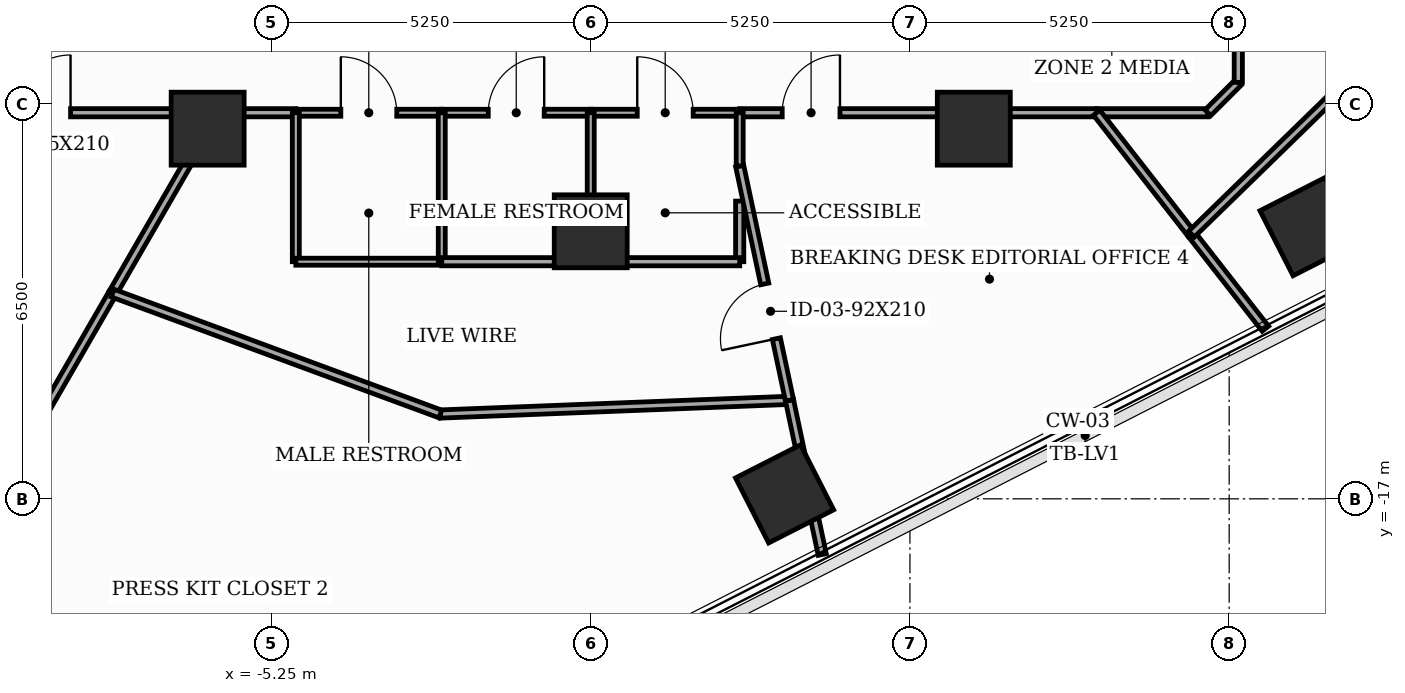
"""IFC4 building model, lengths in metres.
Left out: names, types, materials, properties, quantities, classifications, styles, units other than length and angle.
Written with IfcOpenShell. Run it as: python <this file> out.ifc"""

import sys

from ifc_helpers import new_model, si_unit, direction, frame, frame_2d, origin, origin_2d, place, context, subcontext, project, spatial, rectangle, extrude, element, fill, save


model = new_model("IFC4")
c1 = context("Model", 3, precision=1e-05, world=origin(), true_north=direction((0.0, 1.0)))
c2 = subcontext(c1, "Body", "Model", "MODEL_VIEW")
j1 = project(units=[si_unit("LENGTHUNIT", "METRE"), si_unit("PLANEANGLEUNIT", "RADIAN")], contexts=[c1])
p1 = place(None, origin())
s1 = spatial("IfcSite", under=j1, at=p1, CompositionType="ELEMENT")
p2 = place(p1, origin())
s2 = spatial("IfcBuilding", under=s1, at=p2, CompositionType="ELEMENT")
p3 = place(p2, frame((0.0, 0.0, 142.1)))
s3 = spatial("IfcBuildingStorey", under=s2, at=p3, CompositionType="ELEMENT", Elevation=142.1)
for number, where, z_axis, x_axis in (
    (1, (-6.3, -10.912, 0.0), (0.0, 0.0, 1.0), (1.0, 0.0, 0.0)),
    (2, (0.0, -12.6, 0.0), (0.0, 0.0, 1.0), (1.0, 0.0, 0.0)),
    (3, (6.3, -10.912, 0.0), (0.0, 0.0, 1.0), (1.0, 0.0, 0.0)),
    (4, (3.188, -16.918, 0.0), (0.0, 0.0, 1.0), (0.891, 0.454, 0.0)),
    (5, (11.813, -12.524, 0.0), (0.0, 0.0, 1.0), (0.891, 0.454, 0.0)),
):
    element("IfcColumn", number, at=place(p3, frame(where, z_axis=z_axis, x_axis=x_axis)), inside=s3, PredefinedType="COLUMN", context=c2, shape_type="SweptSolid", body=[
        extrude(rectangle(XDim=1.2, YDim=1.2, at=origin_2d()), origin(), (0.0, 0.0, 1.0), 3.7),
    ])
p4 = place(p3, frame((-10.15, -10.65, 0.0), z_axis=(0.0, 0.0, 1.0), x_axis=(1.0, 0.0, 0.0)))
e6 = element("IfcWall", 6, at=p4, inside=s3, PredefinedType="PARTITIONING", context=c2, shape_type="SweptSolid", body=[
    extrude(rectangle(XDim=4.001, YDim=0.135, at=frame_2d((2.0, 0.0))), origin(), (0.0, 0.0, 1.0), 2.785),
])
p5 = place(p4, frame((0.645, 0.0, 0.0)))
e7 = element("IfcOpeningElement", 7, at=p5, cuts=e6, PredefinedType="OPENING", context=c2, shape_type="SweptSolid", body=[
    extrude(rectangle(XDim=0.95, YDim=2.1, at=frame_2d((0.475, 1.05))), frame((0.0, 0.077, 0.0), z_axis=(0.0, -1.0, 0.0), x_axis=(1.0, 0.0, 0.0)), (0.0, 0.0, 1.0), 0.155),
])
p6 = place(p3, frame((-4.85, -10.65, 0.0), z_axis=(0.0, 0.0, 1.0), x_axis=(1.0, 0.0, 0.0)))
e8 = element("IfcWall", 8, at=p6, inside=s3, PredefinedType="PARTITIONING", context=c2, shape_type="SweptSolid", body=[
    extrude(rectangle(XDim=2.4, YDim=0.115, at=frame_2d((1.2, 0.0))), origin(), (0.0, 0.0, 1.0), 3.5),
])
p7 = place(p6, frame((0.74, 0.0, 0.0)))
e9 = element("IfcOpeningElement", 9, at=p7, cuts=e8, PredefinedType="OPENING", context=c2, shape_type="SweptSolid", body=[
    extrude(rectangle(XDim=0.92, YDim=2.1, at=frame_2d((0.46, 1.05))), frame((0.0, 0.067, 0.0), z_axis=(0.0, -1.0, 0.0), x_axis=(1.0, 0.0, 0.0)), (0.0, 0.0, 1.0), 0.135),
])
p8 = place(p3, frame((-6.149, -10.65, 0.0), z_axis=(0.0, 0.0, 1.0), x_axis=(1.0, 0.0, 0.0)))
e10 = element("IfcWall", 10, at=p8, inside=s3, PredefinedType="PARTITIONING", context=c2, shape_type="SweptSolid", body=[
    extrude(rectangle(XDim=1.299, YDim=0.135, at=frame_2d((0.649, 0.0))), origin(), (0.0, 0.0, 1.0), 3.5),
])
p9 = place(p3, frame((-2.45, -10.65, 0.0), z_axis=(0.0, 0.0, 1.0), x_axis=(1.0, 0.0, 0.0)))
e11 = element("IfcWall", 11, at=p9, inside=s3, PredefinedType="PARTITIONING", context=c2, shape_type="SweptSolid", body=[
    extrude(rectangle(XDim=2.45, YDim=0.115, at=frame_2d((1.225, 0.0))), origin(), (0.0, 0.0, 1.0), 2.785),
])
p10 = place(p9, frame((0.765, 0.0, 0.0)))
e12 = element("IfcOpeningElement", 12, at=p10, cuts=e11, PredefinedType="OPENING", context=c2, shape_type="SweptSolid", body=[
    extrude(rectangle(XDim=0.92, YDim=2.1, at=frame_2d((0.46, 1.05))), frame((0.0, 0.067, 0.0), z_axis=(0.0, -1.0, 0.0), x_axis=(1.0, 0.0, 0.0)), (0.0, 0.0, 1.0), 0.135),
])
p11 = place(p3, frame((0.0, -10.65, 0.0), z_axis=(0.0, 0.0, 1.0), x_axis=(1.0, 0.0, 0.0)))
e13 = element("IfcWall", 13, at=p11, inside=s3, PredefinedType="PARTITIONING", context=c2, shape_type="SweptSolid", body=[
    extrude(rectangle(XDim=2.45, YDim=0.115, at=frame_2d((1.225, 0.0))), origin(), (0.0, 0.0, 1.0), 3.5),
])
p12 = place(p11, frame((0.765, 0.0, 0.0)))
e14 = element("IfcOpeningElement", 14, at=p12, cuts=e13, PredefinedType="OPENING", context=c2, shape_type="SweptSolid", body=[
    extrude(rectangle(XDim=0.92, YDim=2.1, at=frame_2d((0.46, 1.05))), frame((0.0, 0.067, 0.0), z_axis=(0.0, -1.0, 0.0), x_axis=(1.0, 0.0, 0.0)), (0.0, 0.0, 1.0), 0.135),
])
p13 = place(p3, frame((2.45, -10.65, 0.0), z_axis=(0.0, 0.0, 1.0), x_axis=(1.0, 0.0, 0.0)))
e15 = element("IfcWall", 15, at=p13, inside=s3, PredefinedType="PARTITIONING", context=c2, shape_type="SweptSolid", body=[
    extrude(rectangle(XDim=5.871, YDim=0.135, at=frame_2d((2.936, 0.0))), origin(), (0.0, 0.0, 1.0), 2.785),
])
p14 = place(p13, frame((0.699, 0.0, 0.0)))
e16 = element("IfcOpeningElement", 16, at=p14, cuts=e15, PredefinedType="OPENING", context=c2, shape_type="SweptSolid", body=[
    extrude(rectangle(XDim=0.95, YDim=2.1, at=frame_2d((0.475, 1.05))), frame((0.0, 0.077, 0.0), z_axis=(0.0, -1.0, 0.0), x_axis=(1.0, 0.0, 0.0)), (0.0, 0.0, 1.0), 0.155),
])
p15 = place(p3, frame((8.321, -10.65, 0.0), z_axis=(0.0, 0.0, 1.0), x_axis=(1.0, 0.0, 0.0)))
e17 = element("IfcWall", 17, at=p15, inside=s3, PredefinedType="PARTITIONING", context=c2, shape_type="SweptSolid", body=[
    extrude(rectangle(XDim=1.829, YDim=0.135, at=frame_2d((0.915, 0.0))), origin(), (0.0, 0.0, 1.0), 3.5),
])
p16 = place(p3, frame((10.15, -10.65, 0.0), z_axis=(0.0, 0.0, 1.0), x_axis=(0.707106781187, 0.707106781187, 0.0)))
e18 = element("IfcWall", 18, at=p16, inside=s3, PredefinedType="PARTITIONING", context=c2, shape_type="SweptSolid", body=[
    extrude(rectangle(XDim=0.707, YDim=0.135, at=frame_2d((0.354, 0.0))), origin(), (0.0, 0.0, 1.0), 3.5),
])
p17 = place(p3, frame((10.65, -10.15, 0.0), z_axis=(0.0, 0.0, 1.0), x_axis=(0.0, 1.0, 0.0)))
e19 = element("IfcWall", 19, at=p17, inside=s3, PredefinedType="PARTITIONING", context=c2, shape_type="SweptSolid", body=[
    extrude(rectangle(XDim=5.408, YDim=0.135, at=frame_2d((2.704, 0.0))), origin(), (0.0, 0.0, 1.0), 2.785),
])
p18 = place(p17, frame((0.607, 0.0, 0.0)))
e20 = element("IfcOpeningElement", 20, at=p18, cuts=e19, PredefinedType="OPENING", context=c2, shape_type="SweptSolid", body=[
    extrude(rectangle(XDim=0.95, YDim=2.1, at=frame_2d((0.475, 1.05))), frame((0.0, 0.077, 0.0), z_axis=(0.0, -1.0, 0.0), x_axis=(1.0, 0.0, 0.0)), (0.0, 0.0, 1.0), 0.155),
])
p19 = place(p3, frame((-15.633, -27.077, 0.0), z_axis=(0.0, 0.0, 1.0), x_axis=(0.499977642092, 0.866038311744, 0.0)))
e21 = element("IfcWall", 21, at=p19, inside=s3, PredefinedType="PARTITIONING", context=c2, shape_type="SweptSolid", body=[
    extrude(rectangle(XDim=15.542, YDim=0.135, at=frame_2d((7.771, 0.0))), origin(), (0.0, 0.0, 1.0), 2.985),
])
p20 = place(p19, frame((7.311, 0.0, 0.0)))
e22 = element("IfcOpeningElement", 22, at=p20, cuts=e21, PredefinedType="OPENING", context=c2, shape_type="SweptSolid", body=[
    extrude(rectangle(XDim=0.92, YDim=2.1, at=frame_2d((0.46, 1.05))), frame((0.0, 0.077, 0.0), z_axis=(0.0, -1.0, 0.0), x_axis=(1.0, 0.0, 0.0)), (0.0, 0.0, 1.0), 0.155),
])
p21 = place(p3, frame((-7.862, -13.617, 0.0), z_axis=(0.0, 0.0, 1.0), x_axis=(0.500024700597, 0.866011142419, 0.0)))
e23 = element("IfcWall", 23, at=p21, inside=s3, PredefinedType="PARTITIONING", context=c2, shape_type="SweptSolid", body=[
    extrude(rectangle(XDim=3.426, YDim=0.135, at=frame_2d((1.713, 0.0))), origin(), (0.0, 0.0, 1.0), 2.785),
])
p22 = place(p3, frame((3.269, -15.38, 0.0), z_axis=(0.0, 0.0, 1.0), x_axis=(-0.999232211705, -0.039178911299, 0.0)))
e24 = element("IfcWall", 24, at=p22, inside=s3, PredefinedType="PARTITIONING", context=c2, shape_type="SweptSolid", body=[
    extrude(rectangle(XDim=5.745, YDim=0.135, at=frame_2d((2.873, 0.0))), origin(), (0.0, 0.0, 1.0), 2.885),
])
p23 = place(p3, frame((-2.472, -15.605, 0.0), z_axis=(0.0, 0.0, 1.0), x_axis=(-0.938218989818, 0.34604208869, 0.0)))
e25 = element("IfcWall", 25, at=p23, inside=s3, PredefinedType="PARTITIONING", context=c2, shape_type="SweptSolid", body=[
    extrude(rectangle(XDim=5.745, YDim=0.135, at=frame_2d((2.873, 0.0))), origin(), (0.0, 0.0, 1.0), 3.5),
])
p24 = place(p3, frame((3.808, -17.916, 0.0), z_axis=(0.0, 0.0, 1.0), x_axis=(-0.207728113852, 0.978186603218, 0.0)))
e26 = element("IfcWall", 26, at=p24, inside=s3, PredefinedType="PARTITIONING", context=c2, shape_type="SweptSolid", body=[
    extrude(rectangle(XDim=2.593, YDim=0.135, at=frame_2d((1.296, 0.0))), origin(), (0.0, 0.0, 1.0), 2.985),
])
p25 = place(p3, frame((-4.85, -10.65, 0.0), z_axis=(0.0, 0.0, 1.0), x_axis=(0.0, -1.0, 0.0)))
e27 = element("IfcWall", 27, at=p25, inside=s3, PredefinedType="PARTITIONING", context=c2, shape_type="SweptSolid", body=[
    extrude(rectangle(XDim=2.45, YDim=0.115, at=frame_2d((1.225, 0.0))), origin(), (0.0, 0.0, 1.0), 2.785),
])
p26 = place(p3, frame((-4.85, -13.1, 0.0), z_axis=(0.0, 0.0, 1.0), x_axis=(1.0, 0.0, 0.0)))
e28 = element("IfcWall", 28, at=p26, inside=s3, PredefinedType="PARTITIONING", context=c2, shape_type="SweptSolid", body=[
    extrude(rectangle(XDim=2.4, YDim=0.115, at=frame_2d((1.2, 0.0))), origin(), (0.0, 0.0, 1.0), 3.5),
])
p27 = place(p3, frame((-2.45, -13.1, 0.0), z_axis=(0.0, 0.0, 1.0), x_axis=(0.0, 1.0, 0.0)))
e29 = element("IfcWall", 29, at=p27, inside=s3, PredefinedType="PARTITIONING", context=c2, shape_type="SweptSolid", body=[
    extrude(rectangle(XDim=2.45, YDim=0.115, at=frame_2d((1.225, 0.0))), origin(), (0.0, 0.0, 1.0), 2.785),
])
p28 = place(p3, frame((0.0, -13.1, 0.0), z_axis=(0.0, 0.0, 1.0), x_axis=(-1.0, 0.0, 0.0)))
e30 = element("IfcWall", 30, at=p28, inside=s3, PredefinedType="PARTITIONING", context=c2, shape_type="SweptSolid", body=[
    extrude(rectangle(XDim=2.45, YDim=0.135, at=frame_2d((1.225, 0.0))), origin(), (0.0, 0.0, 1.0), 2.885),
])
p29 = place(p3, frame((2.45, -12.103, 0.0), z_axis=(0.0, 0.0, 1.0), x_axis=(0.0, -1.0, 0.0)))
e31 = element("IfcWall", 31, at=p29, inside=s3, PredefinedType="PARTITIONING", context=c2, shape_type="SweptSolid", body=[
    extrude(rectangle(XDim=0.997, YDim=0.135, at=frame_2d((0.499, 0.0))), origin(), (0.0, 0.0, 1.0), 2.785),
])
p30 = place(p3, frame((2.45, -13.1, 0.0), z_axis=(0.0, 0.0, 1.0), x_axis=(-1.0, 0.0, 0.0)))
e32 = element("IfcWall", 32, at=p30, inside=s3, PredefinedType="PARTITIONING", context=c2, shape_type="SweptSolid", body=[
    extrude(rectangle(XDim=2.45, YDim=0.135, at=frame_2d((1.225, 0.0))), origin(), (0.0, 0.0, 1.0), 2.885),
])
p31 = place(p3, frame((3.269, -15.38, 0.0), z_axis=(0.0, 0.0, 1.0), x_axis=(-0.207886916666, 0.978152866314, 0.0)))
e33 = element("IfcWall", 33, at=p31, inside=s3, PredefinedType="PARTITIONING", context=c2, shape_type="SweptSolid", body=[
    extrude(rectangle(XDim=3.94, YDim=0.135, at=frame_2d((1.97, 0.0))), origin(), (0.0, 0.0, 1.0), 2.785),
])
p32 = place(p31, frame((1.037, 0.0, 0.0)))
e34 = element("IfcOpeningElement", 34, at=p32, cuts=e33, PredefinedType="OPENING", context=c2, shape_type="SweptSolid", body=[
    extrude(rectangle(XDim=0.92, YDim=2.1, at=frame_2d((0.46, 1.05))), frame((0.0, 0.077, 0.0), z_axis=(0.0, -1.0, 0.0), x_axis=(1.0, 0.0, 0.0)), (0.0, 0.0, 1.0), 0.155),
])
p33 = place(p3, frame((0.0, -13.1, 0.0), z_axis=(0.0, 0.0, 1.0), x_axis=(0.0, 1.0, 0.0)))
e35 = element("IfcWall", 35, at=p33, inside=s3, PredefinedType="PARTITIONING", context=c2, shape_type="SweptSolid", body=[
    extrude(rectangle(XDim=2.45, YDim=0.115, at=frame_2d((1.225, 0.0))), origin(), (0.0, 0.0, 1.0), 2.785),
])
p34 = place(p3, frame((2.45, -11.526, 0.0), z_axis=(0.0, 0.0, 1.0), x_axis=(0.0, 1.0, 0.0)))
e36 = element("IfcWall", 36, at=p34, inside=s3, PredefinedType="PARTITIONING", context=c2, shape_type="SweptSolid", body=[
    extrude(rectangle(XDim=0.876, YDim=0.115, at=frame_2d((0.438, 0.0))), origin(), (0.0, 0.0, 1.0), 3.5),
])
p35 = place(p3, frame((9.88, -12.646, 0.0), z_axis=(0.0, 0.0, 1.0), x_axis=(-0.61549437888, 0.788141275132, 0.0)))
e37 = element("IfcWall", 37, at=p35, inside=s3, PredefinedType="PARTITIONING", context=c2, shape_type="SweptSolid", body=[
    extrude(rectangle(XDim=2.533, YDim=0.135, at=frame_2d((1.266, 0.0))), origin(), (0.0, 0.0, 1.0), 2.885),
])
p36 = place(p3, frame((11.096, -14.202, 0.0), z_axis=(0.0, 0.0, 1.0), x_axis=(-0.615761561206, 0.78793254771, 0.0)))
e38 = element("IfcWall", 38, at=p36, inside=s3, PredefinedType="PARTITIONING", context=c2, shape_type="SweptSolid", body=[
    extrude(rectangle(XDim=1.975, YDim=0.135, at=frame_2d((0.988, 0.0))), origin(), (0.0, 0.0, 1.0), 2.985),
])
p37 = place(p3, frame((9.88, -12.646, 0.0), z_axis=(0.0, 0.0, 1.0), x_axis=(0.716390870365, 0.697699162145, 0.0)))
e39 = element("IfcWall", 39, at=p37, inside=s3, PredefinedType="PARTITIONING", context=c2, shape_type="SweptSolid", body=[
    extrude(rectangle(XDim=3.918, YDim=0.135, at=frame_2d((1.959, 0.0))), origin(), (0.0, 0.0, 1.0), 2.885),
])
p38 = place(p5, origin())
e40 = element("IfcDoor", 40, at=p38, inside=s3, OperationType="SINGLE_SWING_RIGHT", PredefinedType="DOOR", context=c2, shape_type="SweptSolid", body=[
    extrude(rectangle(XDim=0.95, YDim=2.1, at=frame_2d((0.475, 1.05))), frame((0.0, 0.025, 0.0), z_axis=(0.0, -1.0, 0.0), x_axis=(1.0, 0.0, 0.0)), (0.0, 0.0, 1.0), 0.05),
])
fill(e7, e40)
p39 = place(p7, origin())
e41 = element("IfcDoor", 41, at=p39, inside=s3, OperationType="SINGLE_SWING_LEFT", PredefinedType="DOOR", context=c2, shape_type="SweptSolid", body=[
    extrude(rectangle(XDim=0.92, YDim=2.1, at=frame_2d((0.46, 1.05))), frame((0.0, 0.025, 0.0), z_axis=(0.0, -1.0, 0.0), x_axis=(1.0, 0.0, 0.0)), (0.0, 0.0, 1.0), 0.05),
])
fill(e9, e41)
p40 = place(p10, origin())
e42 = element("IfcDoor", 42, at=p40, inside=s3, OperationType="SINGLE_SWING_RIGHT", PredefinedType="DOOR", context=c2, shape_type="SweptSolid", body=[
    extrude(rectangle(XDim=0.92, YDim=2.1, at=frame_2d((0.46, 1.05))), frame((0.0, 0.025, 0.0), z_axis=(0.0, -1.0, 0.0), x_axis=(1.0, 0.0, 0.0)), (0.0, 0.0, 1.0), 0.05),
])
fill(e12, e42)
p41 = place(p12, origin())
e43 = element("IfcDoor", 43, at=p41, inside=s3, OperationType="SINGLE_SWING_LEFT", PredefinedType="DOOR", context=c2, shape_type="SweptSolid", body=[
    extrude(rectangle(XDim=0.92, YDim=2.1, at=frame_2d((0.46, 1.05))), frame((0.0, 0.025, 0.0), z_axis=(0.0, -1.0, 0.0), x_axis=(1.0, 0.0, 0.0)), (0.0, 0.0, 1.0), 0.05),
])
fill(e14, e43)
p42 = place(p14, origin())
e44 = element("IfcDoor", 44, at=p42, inside=s3, OperationType="SINGLE_SWING_RIGHT", PredefinedType="DOOR", context=c2, shape_type="SweptSolid", body=[
    extrude(rectangle(XDim=0.95, YDim=2.1, at=frame_2d((0.475, 1.05))), frame((0.0, 0.025, 0.0), z_axis=(0.0, -1.0, 0.0), x_axis=(1.0, 0.0, 0.0)), (0.0, 0.0, 1.0), 0.05),
])
fill(e16, e44)
p43 = place(p32, origin())
e45 = element("IfcDoor", 45, at=p43, inside=s3, OperationType="SINGLE_SWING_LEFT", PredefinedType="DOOR", context=c2, shape_type="SweptSolid", body=[
    extrude(rectangle(XDim=0.92, YDim=2.1, at=frame_2d((0.46, 1.05))), frame((0.0, 0.025, 0.0), z_axis=(0.0, -1.0, 0.0), x_axis=(1.0, 0.0, 0.0)), (0.0, 0.0, 1.0), 0.05),
])
fill(e34, e45)
save(model, sys.argv[1])
